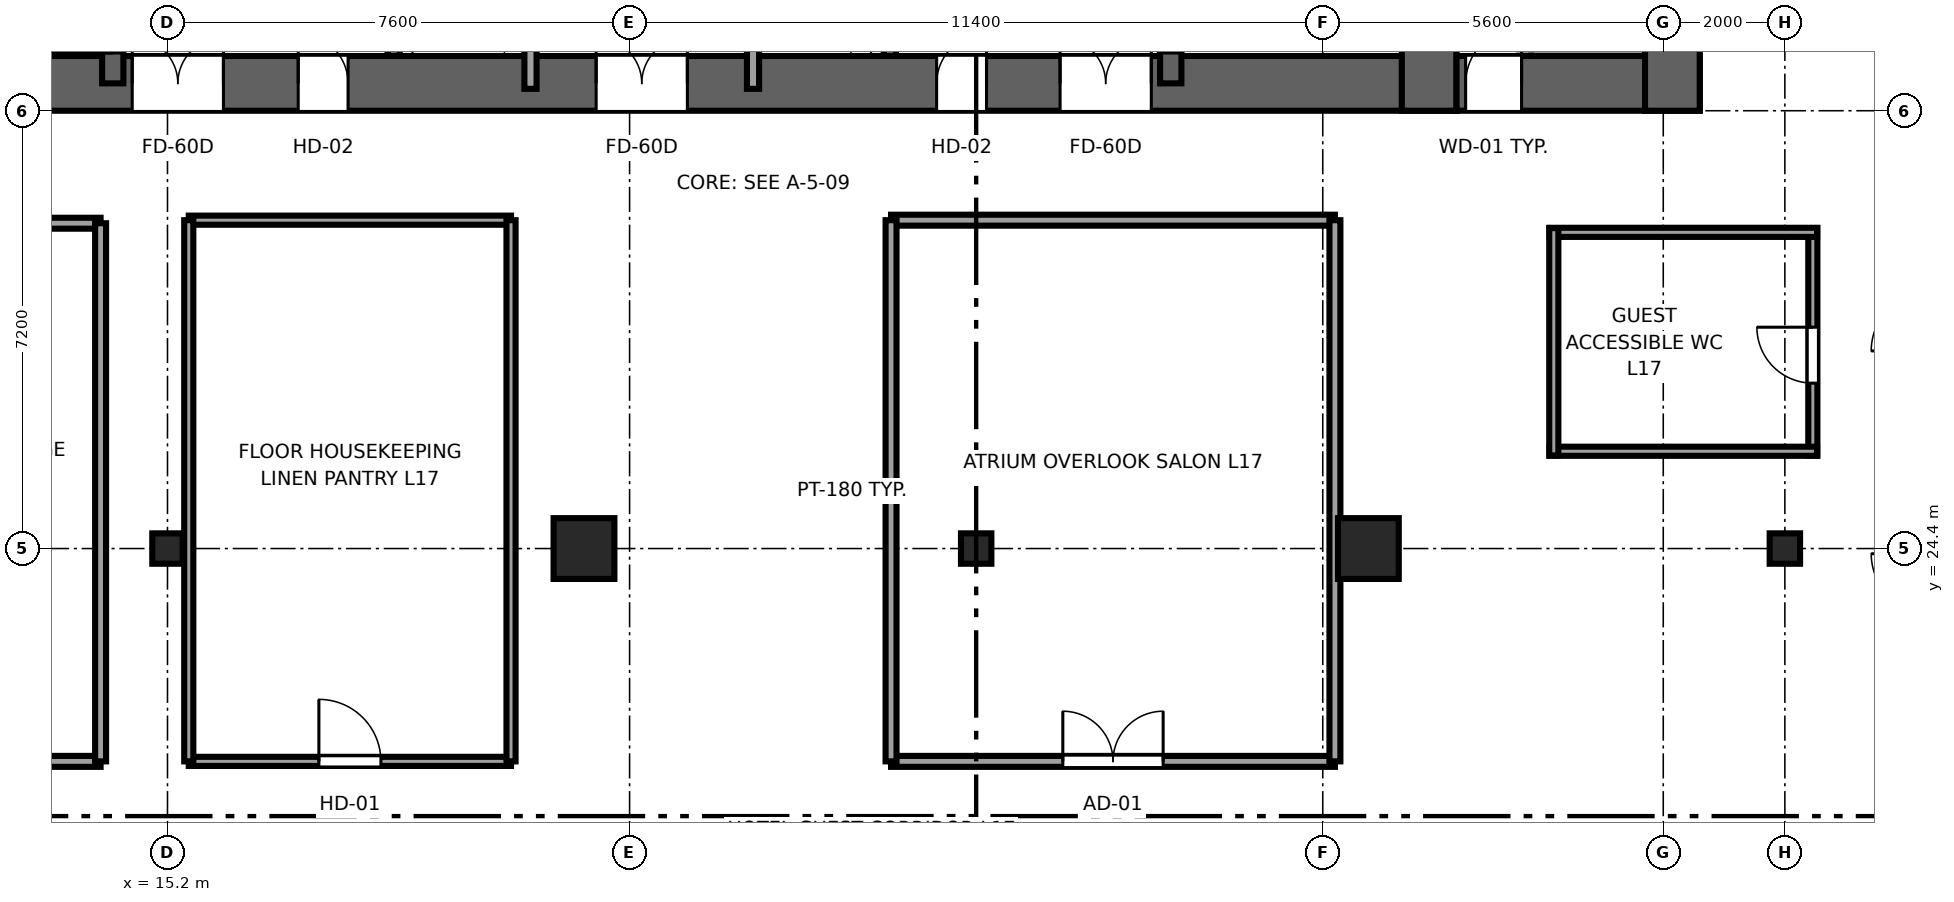
"""IFC4 building model, lengths in metres.
Left out: names, types, materials, properties, quantities, classifications, styles, units other than length and angle.
Written with IfcOpenShell. Run it as: python <this file> out.ifc"""

import sys

from ifc_helpers import new_model, si_unit, direction, frame, frame_2d, origin, origin_2d, place, context, subcontext, project, spatial, rectangle, i_section, extrude, source, transform, mapped, element, fill, save


model = new_model("IFC4")
c1 = context("Model", 3, precision=1e-05, world=origin(), true_north=direction((0.0, 1.0)))
c2 = subcontext(c1, "Body", "Model", "MODEL_VIEW")
j1 = project(units=[si_unit("LENGTHUNIT", "METRE"), si_unit("PLANEANGLEUNIT", "RADIAN")], contexts=[c1])
p1 = place(None, origin())
s1 = spatial("IfcSite", under=j1, at=p1, CompositionType="ELEMENT")
p2 = place(p1, origin())
s2 = spatial("IfcBuilding", under=s1, at=p2, CompositionType="ELEMENT")
p3 = place(p2, frame((0.0, 0.0, 71.05)))
s3 = spatial("IfcBuildingStorey", under=s2, at=p3, CompositionType="ELEMENT", Elevation=71.05)
p4 = place(p3, frame((9.6, 32.05, 0.0), z_axis=(0.0, 0.0, 1.0), x_axis=(1.0, 0.0, 0.0)))
e1 = element("IfcWall", 1, at=p4, inside=s3, PredefinedType="SHEAR", context=c2, shape_type="SweptSolid", body=[
    extrude(rectangle(XDim=26.8, YDim=0.9, at=frame_2d((13.4, 0.0))), origin(), (0.0, 0.0, 1.0), 3.55),
])
p5 = place(p4, frame((6.52, 0.0, 0.0), z_axis=(0.0, 0.0, 1.0), x_axis=(-1.0, 0.0, 0.0)))
e2 = element("IfcOpeningElement", 2, at=p5, cuts=e1, PredefinedType="OPENING", context=c2, shape_type="SweptSolid", body=[
    extrude(rectangle(XDim=1.5, YDim=2.04, at=frame_2d((0.75, 1.02))), frame((0.0, 0.46, 0.0), z_axis=(0.0, -1.0, 0.0), x_axis=(1.0, 0.0, 0.0)), (0.0, 0.0, 1.0), 0.92),
])
p6 = place(p4, frame((14.15, 0.0, 0.0), z_axis=(0.0, 0.0, 1.0), x_axis=(-1.0, 0.0, 0.0)))
e3 = element("IfcOpeningElement", 3, at=p6, cuts=e1, PredefinedType="OPENING", context=c2, shape_type="SweptSolid", body=[
    extrude(rectangle(XDim=1.5, YDim=2.04, at=frame_2d((0.75, 1.02))), frame((0.0, 0.46, 0.0), z_axis=(0.0, -1.0, 0.0), x_axis=(1.0, 0.0, 0.0)), (0.0, 0.0, 1.0), 0.92),
])
p7 = place(p4, frame((21.78, 0.0, 0.0), z_axis=(0.0, 0.0, 1.0), x_axis=(-1.0, 0.0, 0.0)))
e4 = element("IfcOpeningElement", 4, at=p7, cuts=e1, PredefinedType="OPENING", context=c2, shape_type="SweptSolid", body=[
    extrude(rectangle(XDim=1.5, YDim=2.04, at=frame_2d((0.75, 1.02))), frame((0.0, 0.46, 0.0), z_axis=(0.0, -1.0, 0.0), x_axis=(1.0, 0.0, 0.0)), (0.0, 0.0, 1.0), 0.92),
])
p8 = place(p4, frame((8.57, 0.0, 0.0), z_axis=(0.0, 0.0, 1.0), x_axis=(-1.0, 0.0, 0.0)))
e5 = element("IfcOpeningElement", 5, at=p8, cuts=e1, PredefinedType="OPENING", context=c2, shape_type="SweptSolid", body=[
    extrude(rectangle(XDim=0.82, YDim=2.01, at=frame_2d((0.41, 1.005))), frame((0.0, 0.46, 0.0), z_axis=(0.0, -1.0, 0.0), x_axis=(1.0, 0.0, 0.0)), (0.0, 0.0, 1.0), 0.92),
])
p9 = place(p4, frame((19.07, 0.0, 0.0), z_axis=(0.0, 0.0, 1.0), x_axis=(-1.0, 0.0, 0.0)))
e6 = element("IfcOpeningElement", 6, at=p9, cuts=e1, PredefinedType="OPENING", context=c2, shape_type="SweptSolid", body=[
    extrude(rectangle(XDim=0.82, YDim=2.01, at=frame_2d((0.41, 1.005))), frame((0.0, 0.46, 0.0), z_axis=(0.0, -1.0, 0.0), x_axis=(1.0, 0.0, 0.0)), (0.0, 0.0, 1.0), 0.92),
])
p10 = place(p3, frame((35.95, 31.6, 0.0), z_axis=(0.0, 0.0, 1.0), x_axis=(0.0, 1.0, 0.0)))
e7 = element("IfcWall", 7, at=p10, inside=s3, PredefinedType="SHEAR", context=c2, shape_type="SweptSolid", body=[
    extrude(rectangle(XDim=13.6, YDim=0.9, at=frame_2d((6.8, 0.0))), origin(), (0.0, 0.0, 1.0), 3.55),
])
p11 = place(p3, frame((14.3, 32.05, 0.0), z_axis=(0.0, 0.0, 1.0), x_axis=(0.0, 1.0, 0.0)))
e8 = element("IfcWall", 8, at=p11, inside=s3, PredefinedType="SHEAR", context=c2, shape_type="SweptSolid", body=[
    extrude(rectangle(XDim=12.7, YDim=0.35, at=frame_2d((6.35, 0.0))), origin(), (0.0, 0.0, 1.0), 3.55),
])
p12 = place(p11, frame((0.5, 0.0, 0.0)))
e9 = element("IfcOpeningElement", 9, at=p12, cuts=e8, PredefinedType="OPENING", context=c2, shape_type="SweptSolid", body=[
    extrude(rectangle(XDim=1.1, YDim=2.12, at=frame_2d((0.55, 1.06))), frame((0.0, 0.185, 0.0), z_axis=(0.0, -1.0, 0.0), x_axis=(1.0, 0.0, 0.0)), (0.0, 0.0, 1.0), 0.37),
])
p13 = place(p3, frame((31.7, 32.05, 0.0), z_axis=(0.0, 0.0, 1.0), x_axis=(0.0, 1.0, 0.0)))
e10 = element("IfcWall", 10, at=p13, inside=s3, PredefinedType="SHEAR", context=c2, shape_type="SweptSolid", body=[
    extrude(rectangle(XDim=12.7, YDim=0.35, at=frame_2d((6.35, 0.0))), origin(), (0.0, 0.0, 1.0), 3.55),
])
p14 = place(p13, frame((1.6, 0.0, 0.0), z_axis=(0.0, 0.0, 1.0), x_axis=(-1.0, 0.0, 0.0)))
e11 = element("IfcOpeningElement", 11, at=p14, cuts=e10, PredefinedType="OPENING", context=c2, shape_type="SweptSolid", body=[
    extrude(rectangle(XDim=1.1, YDim=2.12, at=frame_2d((0.55, 1.06))), frame((0.0, 0.185, 0.0), z_axis=(0.0, -1.0, 0.0), x_axis=(1.0, 0.0, 0.0)), (0.0, 0.0, 1.0), 0.37),
])
p15 = place(p3, frame((36.4, 32.05, 0.0), z_axis=(0.0, 0.0, 1.0), x_axis=(1.0, 0.0, 0.0)))
e12 = element("IfcWall", 12, at=p15, inside=s3, PredefinedType="SHEAR", context=c2, shape_type="SweptSolid", body=[
    extrude(rectangle(XDim=4.0, YDim=0.9, at=frame_2d((2.0, 0.0))), origin(), (0.0, 0.0, 1.0), 3.55),
])
p16 = place(p15, frame((1.07, 0.0, 0.0), z_axis=(0.0, 0.0, 1.0), x_axis=(-1.0, 0.0, 0.0)))
e13 = element("IfcOpeningElement", 13, at=p16, cuts=e12, PredefinedType="OPENING", context=c2, shape_type="SweptSolid", body=[
    extrude(rectangle(XDim=0.92, YDim=2.01, at=frame_2d((0.46, 1.005))), frame((0.0, 0.46, 0.0), z_axis=(0.0, -1.0, 0.0), x_axis=(1.0, 0.0, 0.0)), (0.0, 0.0, 1.0), 0.92),
])
p17 = place(p3, frame((39.95, 31.6, 0.0), z_axis=(0.0, 0.0, 1.0), x_axis=(0.0, 1.0, 0.0)))
e14 = element("IfcWall", 14, at=p17, inside=s3, PredefinedType="SHEAR", context=c2, shape_type="SweptSolid", body=[
    extrude(rectangle(XDim=13.6, YDim=0.9, at=frame_2d((6.8, 0.0))), origin(), (0.0, 0.0, 1.0), 3.55),
])
m1 = source(origin(), c2, "Body", "SweptSolid", [
    extrude(i_section(OverallWidth=0.5, OverallDepth=0.5, WebThickness=0.028, FlangeThickness=0.045, at=origin_2d()), origin(), (0.0, 0.0, 1.0), 3.55),
])
p18 = place(p3, frame((15.2, 24.4, 0.0), z_axis=(0.0, 0.0, 1.0), x_axis=(1.0, 0.0, 0.0)))
e15 = element("IfcColumn", 15, at=p18, inside=s3, PredefinedType="COLUMN", context=c2, shape_type="MappedRepresentation", body=[
    mapped(m1, transform((0.0, 0.0, 0.0), x_axis=(1.0, 0.0, 0.0), y_axis=(0.0, 1.0, 0.0), z_axis=(0.0, 0.0, 1.0), scale=1.0)),
])
m2 = source(origin(), c2, "Body", "SweptSolid", [
    extrude(rectangle(XDim=1.0, YDim=1.0, at=origin_2d()), origin(), (0.0, 0.0, 1.0), 3.55),
])
for number, where, z_axis, x_axis in (
    (16, (22.05, 24.4, 0.0), (0.0, 0.0, 1.0), (1.0, 0.0, 0.0)),
    (17, (34.95, 24.4, 0.0), (0.0, 0.0, 1.0), (1.0, 0.0, 0.0)),
):
    element("IfcColumn", number, at=place(p3, frame(where, z_axis=z_axis, x_axis=x_axis)), inside=s3, PredefinedType="COLUMN", context=c2, shape_type="MappedRepresentation", body=[
        mapped(m2, transform((0.0, 0.0, 0.0), x_axis=(1.0, 0.0, 0.0), y_axis=(0.0, 1.0, 0.0), z_axis=(0.0, 0.0, 1.0), scale=1.0)),
    ])
for number, where, z_axis, x_axis in (
    (18, (41.8, 24.4, 0.0), (0.0, 0.0, 1.0), (1.0, 0.0, 0.0)),
    (19, (28.5, 24.4, 0.0), (0.0, 0.0, 1.0), (1.0, 0.0, 0.0)),
):
    element("IfcColumn", number, at=place(p3, frame(where, z_axis=z_axis, x_axis=x_axis)), inside=s3, PredefinedType="COLUMN", context=c2, shape_type="MappedRepresentation", body=[
        mapped(m1, transform((0.0, 0.0, 0.0), x_axis=(1.0, 0.0, 0.0), y_axis=(0.0, 1.0, 0.0), z_axis=(0.0, 0.0, 1.0), scale=1.0)),
    ])
for number, where, z_axis, x_axis in (
    (20, (18.92, 32.504, 0.0), (0.0, 0.0, 1.0), (0.0, 1.0, 0.0)),
    (21, (27.08, 32.504, 0.0), (0.0, 0.0, 1.0), (0.0, 1.0, 0.0)),
):
    element("IfcWall", number, at=place(p3, frame(where, z_axis=z_axis, x_axis=x_axis)), inside=s3, PredefinedType="SOLIDWALL", context=c2, shape_type="SweptSolid", body=[
        extrude(rectangle(XDim=3.646, YDim=0.2, at=frame_2d((1.823, 0.0))), origin(), (0.0, 0.0, 1.0), 3.37),
    ])
for number, where, z_axis, x_axis in (
    (22, (21.17, 31.96, 0.0), (0.0, 0.0, 1.0), (0.0, 1.0, 0.0)),
    (23, (24.83, 31.96, 0.0), (0.0, 0.0, 1.0), (0.0, 1.0, 0.0)),
):
    element("IfcWall", number, at=place(p3, frame(where, z_axis=z_axis, x_axis=x_axis)), inside=s3, PredefinedType="SOLIDWALL", context=c2, shape_type="SweptSolid", body=[
        extrude(rectangle(XDim=12.58, YDim=0.2, at=frame_2d((6.29, 0.0))), origin(), (0.0, 0.0, 1.0), 3.37),
    ])
p19 = place(p3, frame((42.26, 25.93, 0.0), z_axis=(0.0, 0.0, 1.0), x_axis=(0.0, 1.0, 0.0)))
e24 = element("IfcWall", 24, at=p19, inside=s3, PredefinedType="PARTITIONING", context=c2, shape_type="SweptSolid", body=[
    extrude(rectangle(XDim=3.74, YDim=0.15, at=frame_2d((1.87, 0.0))), origin(), (0.0, 0.0, 1.0), 3.37),
])
p20 = place(p19, frame((1.19, 0.0, 0.0)))
e25 = element("IfcOpeningElement", 25, at=p20, cuts=e24, PredefinedType="OPENING", context=c2, shape_type="SweptSolid", body=[
    extrude(rectangle(XDim=0.92, YDim=2.01, at=frame_2d((0.46, 1.005))), frame((0.0, 0.085, 0.0), z_axis=(0.0, -1.0, 0.0), x_axis=(1.0, 0.0, 0.0)), (0.0, 0.0, 1.0), 0.17),
])
for number, where, z_axis, x_axis in (
    (26, (37.93, 26.0, 0.0), (0.0, 0.0, 1.0), (1.0, 0.0, 0.0)),
    (27, (37.93, 29.6, 0.0), (0.0, 0.0, 1.0), (1.0, 0.0, 0.0)),
):
    element("IfcWall", number, at=place(p3, frame(where, z_axis=z_axis, x_axis=x_axis)), inside=s3, PredefinedType="PARTITIONING", context=c2, shape_type="SweptSolid", body=[
        extrude(rectangle(XDim=4.4, YDim=0.15, at=frame_2d((2.2, 0.0))), origin(), (0.0, 0.0, 1.0), 3.37),
    ])
p21 = place(p3, frame((38.0, 25.93, 0.0), z_axis=(0.0, 0.0, 1.0), x_axis=(0.0, 1.0, 0.0)))
e28 = element("IfcWall", 28, at=p21, inside=s3, PredefinedType="PARTITIONING", context=c2, shape_type="SweptSolid", body=[
    extrude(rectangle(XDim=3.74, YDim=0.15, at=frame_2d((1.87, 0.0))), origin(), (0.0, 0.0, 1.0), 3.37),
])
p22 = place(p3, frame((9.88, 20.9, 0.0), z_axis=(0.0, 0.0, 1.0), x_axis=(1.0, 0.0, 0.0)))
e29 = element("IfcWall", 29, at=p22, inside=s3, PredefinedType="PARTITIONING", context=c2, shape_type="SweptSolid", body=[
    extrude(rectangle(XDim=4.22, YDim=0.18, at=frame_2d((2.11, 0.0))), origin(), (0.0, 0.0, 1.0), 3.37),
])
p23 = place(p22, frame((1.285, 0.0, 0.0)))
e30 = element("IfcOpeningElement", 30, at=p23, cuts=e29, PredefinedType="OPENING", context=c2, shape_type="SweptSolid", body=[
    extrude(rectangle(XDim=1.65, YDim=2.15, at=frame_2d((0.825, 1.075))), frame((0.0, 0.1, 0.0), z_axis=(0.0, -1.0, 0.0), x_axis=(1.0, 0.0, 0.0)), (0.0, 0.0, 1.0), 0.2),
])
p24 = place(p3, frame((9.88, 29.75, 0.0), z_axis=(0.0, 0.0, 1.0), x_axis=(1.0, 0.0, 0.0)))
e31 = element("IfcWall", 31, at=p24, inside=s3, PredefinedType="PARTITIONING", context=c2, shape_type="SweptSolid", body=[
    extrude(rectangle(XDim=4.22, YDim=0.18, at=frame_2d((2.11, 0.0))), origin(), (0.0, 0.0, 1.0), 3.37),
])
p25 = place(p3, frame((14.1, 20.9, 0.0), z_axis=(0.0, 0.0, 1.0), x_axis=(0.0, 1.0, 0.0)))
e32 = element("IfcWall", 32, at=p25, inside=s3, PredefinedType="PARTITIONING", context=c2, shape_type="SweptSolid", body=[
    extrude(rectangle(XDim=8.85, YDim=0.18, at=frame_2d((4.425, 0.0))), origin(), (0.0, 0.0, 1.0), 3.37),
])
p26 = place(p3, frame((27.1, 20.9, 0.0), z_axis=(0.0, 0.0, 1.0), x_axis=(1.0, 0.0, 0.0)))
e33 = element("IfcWall", 33, at=p26, inside=s3, PredefinedType="PARTITIONING", context=c2, shape_type="SweptSolid", body=[
    extrude(rectangle(XDim=7.3, YDim=0.18, at=frame_2d((3.65, 0.0))), origin(), (0.0, 0.0, 1.0), 3.37),
])
p27 = place(p26, frame((2.825, 0.0, 0.0)))
e34 = element("IfcOpeningElement", 34, at=p27, cuts=e33, PredefinedType="OPENING", context=c2, shape_type="SweptSolid", body=[
    extrude(rectangle(XDim=1.65, YDim=2.15, at=frame_2d((0.825, 1.075))), frame((0.0, 0.1, 0.0), z_axis=(0.0, -1.0, 0.0), x_axis=(1.0, 0.0, 0.0)), (0.0, 0.0, 1.0), 0.2),
])
p28 = place(p3, frame((27.1, 29.8, 0.0), z_axis=(0.0, 0.0, 1.0), x_axis=(1.0, 0.0, 0.0)))
e35 = element("IfcWall", 35, at=p28, inside=s3, PredefinedType="PARTITIONING", context=c2, shape_type="SweptSolid", body=[
    extrude(rectangle(XDim=7.3, YDim=0.18, at=frame_2d((3.65, 0.0))), origin(), (0.0, 0.0, 1.0), 3.37),
])
for number, where, z_axis, x_axis in (
    (36, (27.1, 20.9, 0.0), (0.0, 0.0, 1.0), (0.0, 1.0, 0.0)),
    (37, (34.4, 20.9, 0.0), (0.0, 0.0, 1.0), (0.0, 1.0, 0.0)),
):
    element("IfcWall", number, at=place(p3, frame(where, z_axis=z_axis, x_axis=x_axis)), inside=s3, PredefinedType="PARTITIONING", context=c2, shape_type="SweptSolid", body=[
        extrude(rectangle(XDim=8.9, YDim=0.18, at=frame_2d((4.45, 0.0))), origin(), (0.0, 0.0, 1.0), 3.37),
    ])
p29 = place(p3, frame((15.55, 20.9, 0.0), z_axis=(0.0, 0.0, 1.0), x_axis=(1.0, 0.0, 0.0)))
e38 = element("IfcWall", 38, at=p29, inside=s3, PredefinedType="PARTITIONING", context=c2, shape_type="SweptSolid", body=[
    extrude(rectangle(XDim=5.3, YDim=0.15, at=frame_2d((2.65, 0.0))), origin(), (0.0, 0.0, 1.0), 3.37),
])
p30 = place(p29, frame((2.14, 0.0, 0.0)))
e39 = element("IfcOpeningElement", 39, at=p30, cuts=e38, PredefinedType="OPENING", context=c2, shape_type="SweptSolid", body=[
    extrude(rectangle(XDim=1.02, YDim=2.03, at=frame_2d((0.51, 1.015))), frame((0.0, 0.085, 0.0), z_axis=(0.0, -1.0, 0.0), x_axis=(1.0, 0.0, 0.0)), (0.0, 0.0, 1.0), 0.17),
])
p31 = place(p3, frame((15.55, 29.8, 0.0), z_axis=(0.0, 0.0, 1.0), x_axis=(1.0, 0.0, 0.0)))
e40 = element("IfcWall", 40, at=p31, inside=s3, PredefinedType="PARTITIONING", context=c2, shape_type="SweptSolid", body=[
    extrude(rectangle(XDim=5.3, YDim=0.15, at=frame_2d((2.65, 0.0))), origin(), (0.0, 0.0, 1.0), 3.37),
])
for number, where, z_axis, x_axis in (
    (41, (15.55, 20.9, 0.0), (0.0, 0.0, 1.0), (0.0, 1.0, 0.0)),
    (42, (20.85, 20.9, 0.0), (0.0, 0.0, 1.0), (0.0, 1.0, 0.0)),
):
    element("IfcWall", number, at=place(p3, frame(where, z_axis=z_axis, x_axis=x_axis)), inside=s3, PredefinedType="PARTITIONING", context=c2, shape_type="SweptSolid", body=[
        extrude(rectangle(XDim=8.9, YDim=0.15, at=frame_2d((4.45, 0.0))), origin(), (0.0, 0.0, 1.0), 3.37),
    ])
m3 = source(origin(), c2, "Body", "SweptSolid", [
    extrude(rectangle(XDim=1.1, YDim=2.12, at=frame_2d((0.55, 1.06))), frame((0.0, 0.025, 0.0), z_axis=(0.0, -1.0, 0.0), x_axis=(1.0, 0.0, 0.0)), (0.0, 0.0, 1.0), 0.05),
])
p32 = place(p12, origin())
e43 = element("IfcDoor", 43, at=p32, inside=s3, OperationType="SINGLE_SWING_LEFT", PredefinedType="DOOR", context=c2, shape_type="MappedRepresentation", body=[
    mapped(m3, transform((0.0, 0.0, 0.0), x_axis=(1.0, 0.0, 0.0), y_axis=(0.0, 1.0, 0.0), z_axis=(0.0, 0.0, 1.0), scale=1.0)),
])
fill(e9, e43)
p33 = place(p14, origin())
e44 = element("IfcDoor", 44, at=p33, inside=s3, OperationType="SINGLE_SWING_RIGHT", PredefinedType="DOOR", context=c2, shape_type="MappedRepresentation", body=[
    mapped(m3, transform((0.0, 0.0, 0.0), x_axis=(1.0, 0.0, 0.0), y_axis=(0.0, 1.0, 0.0), z_axis=(0.0, 0.0, 1.0), scale=1.0)),
])
fill(e11, e44)
m4 = source(origin(), c2, "Body", "SweptSolid", [
    extrude(rectangle(XDim=1.5, YDim=2.04, at=frame_2d((0.75, 1.02))), frame((0.0, 0.025, 0.0), z_axis=(0.0, -1.0, 0.0), x_axis=(1.0, 0.0, 0.0)), (0.0, 0.0, 1.0), 0.05),
])
p34 = place(p5, origin())
e45 = element("IfcDoor", 45, at=p34, inside=s3, OperationType="DOUBLE_DOOR_SINGLE_SWING", PredefinedType="DOOR", context=c2, shape_type="MappedRepresentation", body=[
    mapped(m4, transform((0.0, 0.0, 0.0), x_axis=(1.0, 0.0, 0.0), y_axis=(0.0, 1.0, 0.0), z_axis=(0.0, 0.0, 1.0), scale=1.0)),
])
fill(e2, e45)
p35 = place(p6, origin())
e46 = element("IfcDoor", 46, at=p35, inside=s3, OperationType="DOUBLE_DOOR_SINGLE_SWING", PredefinedType="DOOR", context=c2, shape_type="MappedRepresentation", body=[
    mapped(m4, transform((0.0, 0.0, 0.0), x_axis=(1.0, 0.0, 0.0), y_axis=(0.0, 1.0, 0.0), z_axis=(0.0, 0.0, 1.0), scale=1.0)),
])
fill(e3, e46)
p36 = place(p7, origin())
e47 = element("IfcDoor", 47, at=p36, inside=s3, OperationType="DOUBLE_DOOR_SINGLE_SWING", PredefinedType="DOOR", context=c2, shape_type="MappedRepresentation", body=[
    mapped(m4, transform((0.0, 0.0, 0.0), x_axis=(1.0, 0.0, 0.0), y_axis=(0.0, 1.0, 0.0), z_axis=(0.0, 0.0, 1.0), scale=1.0)),
])
fill(e4, e47)
m5 = source(origin(), c2, "Body", "SweptSolid", [
    extrude(rectangle(XDim=0.82, YDim=2.01, at=frame_2d((0.41, 1.005))), frame((0.0, 0.025, 0.0), z_axis=(0.0, -1.0, 0.0), x_axis=(1.0, 0.0, 0.0)), (0.0, 0.0, 1.0), 0.05),
])
p37 = place(p8, origin())
e48 = element("IfcDoor", 48, at=p37, inside=s3, OperationType="SINGLE_SWING_LEFT", PredefinedType="DOOR", context=c2, shape_type="MappedRepresentation", body=[
    mapped(m5, transform((0.0, 0.0, 0.0), x_axis=(1.0, 0.0, 0.0), y_axis=(0.0, 1.0, 0.0), z_axis=(0.0, 0.0, 1.0), scale=1.0)),
])
fill(e5, e48)
p38 = place(p9, origin())
e49 = element("IfcDoor", 49, at=p38, inside=s3, OperationType="SINGLE_SWING_RIGHT", PredefinedType="DOOR", context=c2, shape_type="MappedRepresentation", body=[
    mapped(m5, transform((0.0, 0.0, 0.0), x_axis=(1.0, 0.0, 0.0), y_axis=(0.0, 1.0, 0.0), z_axis=(0.0, 0.0, 1.0), scale=1.0)),
])
fill(e6, e49)
m6 = source(origin(), c2, "Body", "SweptSolid", [
    extrude(rectangle(XDim=0.92, YDim=2.01, at=frame_2d((0.46, 1.005))), frame((0.0, 0.025, 0.0), z_axis=(0.0, -1.0, 0.0), x_axis=(1.0, 0.0, 0.0)), (0.0, 0.0, 1.0), 0.05),
])
p39 = place(p16, origin())
e50 = element("IfcDoor", 50, at=p39, inside=s3, OperationType="SINGLE_SWING_RIGHT", PredefinedType="DOOR", context=c2, shape_type="MappedRepresentation", body=[
    mapped(m6, transform((0.0, 0.0, 0.0), x_axis=(1.0, 0.0, 0.0), y_axis=(0.0, 1.0, 0.0), z_axis=(0.0, 0.0, 1.0), scale=1.0)),
])
fill(e13, e50)
p40 = place(p20, origin())
e51 = element("IfcDoor", 51, at=p40, inside=s3, OperationType="SINGLE_SWING_RIGHT", PredefinedType="DOOR", context=c2, shape_type="MappedRepresentation", body=[
    mapped(m6, transform((0.0, 0.0, 0.0), x_axis=(1.0, 0.0, 0.0), y_axis=(0.0, 1.0, 0.0), z_axis=(0.0, 0.0, 1.0), scale=1.0)),
])
fill(e25, e51)
m7 = source(origin(), c2, "Body", "SweptSolid", [
    extrude(rectangle(XDim=1.65, YDim=2.15, at=frame_2d((0.825, 1.075))), frame((0.0, 0.025, 0.0), z_axis=(0.0, -1.0, 0.0), x_axis=(1.0, 0.0, 0.0)), (0.0, 0.0, 1.0), 0.05),
])
p41 = place(p27, origin())
e52 = element("IfcDoor", 52, at=p41, inside=s3, OperationType="DOUBLE_DOOR_SINGLE_SWING", PredefinedType="DOOR", context=c2, shape_type="MappedRepresentation", body=[
    mapped(m7, transform((0.0, 0.0, 0.0), x_axis=(1.0, 0.0, 0.0), y_axis=(0.0, 1.0, 0.0), z_axis=(0.0, 0.0, 1.0), scale=1.0)),
])
fill(e34, e52)
m8 = source(origin(), c2, "Body", "SweptSolid", [
    extrude(rectangle(XDim=1.02, YDim=2.03, at=frame_2d((0.51, 1.015))), frame((0.0, 0.025, 0.0), z_axis=(0.0, -1.0, 0.0), x_axis=(1.0, 0.0, 0.0)), (0.0, 0.0, 1.0), 0.05),
])
p42 = place(p30, origin())
e53 = element("IfcDoor", 53, at=p42, inside=s3, OperationType="SINGLE_SWING_LEFT", PredefinedType="DOOR", context=c2, shape_type="MappedRepresentation", body=[
    mapped(m8, transform((0.0, 0.0, 0.0), x_axis=(1.0, 0.0, 0.0), y_axis=(0.0, 1.0, 0.0), z_axis=(0.0, 0.0, 1.0), scale=1.0)),
])
fill(e39, e53)
save(model, sys.argv[1])
